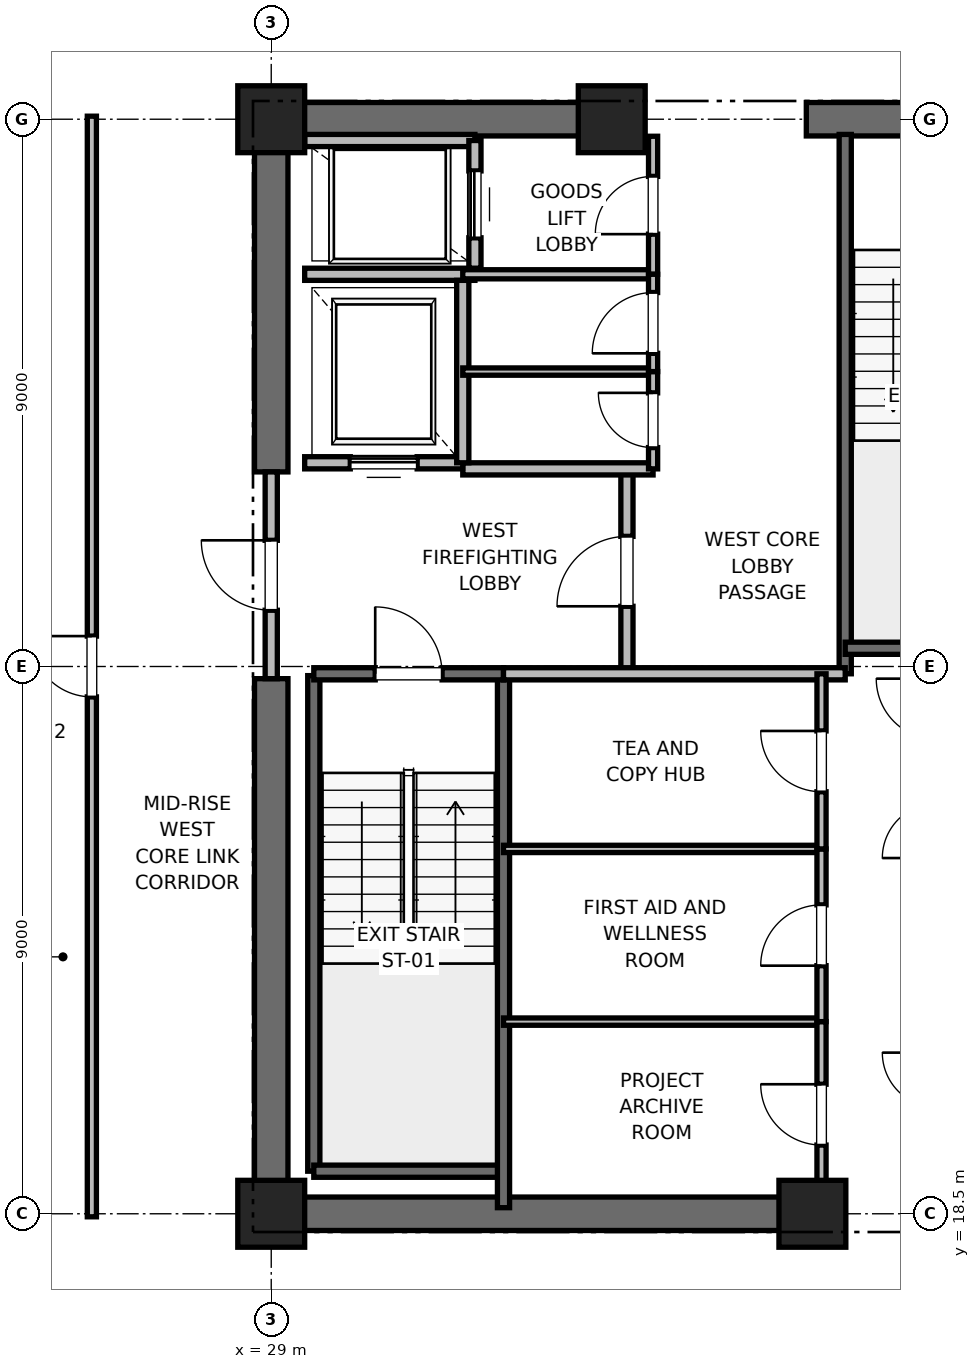
"""IFC4 building model, lengths in metres.
Left out: names, types, materials, properties, quantities, classifications, styles, units other than length and angle.
Written with IfcOpenShell. Run it as: python <this file> out.ifc"""

import sys

from ifc_helpers import new_model, si_unit, direction, frame, frame_2d, origin, origin_2d, place, context, subcontext, project, spatial, rectangle, extrude, element, fill, save


model = new_model("IFC4")
c1 = context("Model", 3, precision=1e-05, world=origin(), true_north=direction((0.0, 1.0)))
c2 = subcontext(c1, "Body", "Model", "MODEL_VIEW")
j1 = project(units=[si_unit("LENGTHUNIT", "METRE"), si_unit("PLANEANGLEUNIT", "RADIAN")], contexts=[c1])
p1 = place(None, origin())
s1 = spatial("IfcSite", under=j1, at=p1, CompositionType="ELEMENT")
p2 = place(p1, origin())
s2 = spatial("IfcBuilding", under=s1, at=p2, CompositionType="ELEMENT")
p3 = place(p2, frame((0.0, 0.0, 148.4)))
s3 = spatial("IfcBuildingStorey", under=s2, at=p3, CompositionType="ELEMENT", Elevation=148.4)
for number, where, z_axis, x_axis in (
    (1, (29.0, 18.5, 0.0), (0.0, 0.0, 1.0), (1.0, 0.0, 0.0)),
    (2, (29.0, 36.5, 0.0), (0.0, 0.0, 1.0), (1.0, 0.0, 0.0)),
    (3, (37.9, 18.5, 0.0), (0.0, 0.0, 1.0), (1.0, 0.0, 0.0)),
    (4, (34.6, 36.5, 0.0), (0.0, 0.0, 1.0), (1.0, 0.0, 0.0)),
):
    element("IfcColumn", number, at=place(p3, frame(where, z_axis=z_axis, x_axis=x_axis)), inside=s3, PredefinedType="PILASTER", context=c2, shape_type="SweptSolid", body=[
        extrude(rectangle(XDim=1.1, YDim=1.1, at=origin_2d()), origin(), (0.0, 0.0, 1.0), 4.0),
    ])
p4 = place(p3, frame((29.0, 18.5, 0.0), z_axis=(0.0, 0.0, 1.0), x_axis=(1.0, 0.0, 0.0)))
e5 = element("IfcWall", 5, at=p4, inside=s3, PredefinedType="SHEAR", context=c2, shape_type="SweptSolid", body=[
    extrude(rectangle(XDim=9.2, YDim=0.55, at=frame_2d((4.6, 0.0))), origin(), (0.0, 0.0, 1.0), 3.775),
])
p5 = place(p3, frame((29.0, 36.5, 0.0), z_axis=(0.0, 0.0, 1.0), x_axis=(1.0, 0.0, 0.0)))
e6 = element("IfcWall", 6, at=p5, inside=s3, PredefinedType="SHEAR", context=c2, shape_type="SweptSolid", body=[
    extrude(rectangle(XDim=5.8, YDim=0.55, at=frame_2d((2.9, 0.0))), origin(), (0.0, 0.0, 1.0), 3.775),
])
p6 = place(p3, frame((37.8, 36.5, 0.0), z_axis=(0.0, 0.0, 1.0), x_axis=(1.0, 0.0, 0.0)))
e7 = element("IfcWall", 7, at=p6, inside=s3, PredefinedType="SHEAR", context=c2, shape_type="SweptSolid", body=[
    extrude(rectangle(XDim=4.4, YDim=0.55, at=frame_2d((2.2, 0.0))), origin(), (0.0, 0.0, 1.0), 3.775),
])
p7 = place(p6, frame((1.65, 0.0, 0.0)))
e8 = element("IfcOpeningElement", 8, at=p7, cuts=e7, PredefinedType="OPENING", context=c2, shape_type="SweptSolid", body=[
    extrude(rectangle(XDim=1.1, YDim=2.15, at=frame_2d((0.55, 1.075))), frame((0.0, 0.275, 0.0), z_axis=(0.0, -1.0, 0.0), x_axis=(1.0, 0.0, 0.0)), (0.0, 0.0, 1.0), 0.55),
])
p8 = place(p3, frame((29.0, 18.5, 0.0), z_axis=(0.0, 0.0, 1.0), x_axis=(0.0, 1.0, 0.0)))
e9 = element("IfcWall", 9, at=p8, inside=s3, PredefinedType="SHEAR", context=c2, shape_type="SweptSolid", body=[
    extrude(rectangle(XDim=8.8, YDim=0.55, at=frame_2d((4.4, 0.0))), origin(), (0.0, 0.0, 1.0), 3.775),
])
p9 = place(p3, frame((29.0, 30.7, 0.0), z_axis=(0.0, 0.0, 1.0), x_axis=(0.0, 1.0, 0.0)))
e10 = element("IfcWall", 10, at=p9, inside=s3, PredefinedType="SHEAR", context=c2, shape_type="SweptSolid", body=[
    extrude(rectangle(XDim=5.8, YDim=0.55, at=frame_2d((2.9, 0.0))), origin(), (0.0, 0.0, 1.0), 3.775),
])
p10 = place(p3, frame((29.7, 19.2, 0.0), z_axis=(0.0, 0.0, 1.0), x_axis=(0.0, 1.0, 0.0)))
e11 = element("IfcWall", 11, at=p10, inside=s3, PredefinedType="SOLIDWALL", context=c2, shape_type="SweptSolid", body=[
    extrude(rectangle(XDim=8.15, YDim=0.2, at=frame_2d((4.075, 0.0))), origin(), (0.0, 0.0, 1.0), 3.775),
])
p11 = place(p3, frame((29.7, 19.2, 0.0), z_axis=(0.0, 0.0, 1.0), x_axis=(1.0, 0.0, 0.0)))
e12 = element("IfcWall", 12, at=p11, inside=s3, PredefinedType="SOLIDWALL", context=c2, shape_type="SweptSolid", body=[
    extrude(rectangle(XDim=3.12, YDim=0.2, at=frame_2d((1.56, 0.0))), origin(), (0.0, 0.0, 1.0), 3.775),
])
p12 = place(p3, frame((32.82, 18.6, 0.0), z_axis=(0.0, 0.0, 1.0), x_axis=(0.0, 1.0, 0.0)))
e13 = element("IfcWall", 13, at=p12, inside=s3, PredefinedType="SOLIDWALL", context=c2, shape_type="SweptSolid", body=[
    extrude(rectangle(XDim=8.78, YDim=0.2, at=frame_2d((4.39, 0.0))), origin(), (0.0, 0.0, 1.0), 3.775),
])
p13 = place(p3, frame((29.7, 27.38, 0.0), z_axis=(0.0, 0.0, 1.0), x_axis=(1.0, 0.0, 0.0)))
e14 = element("IfcWall", 14, at=p13, inside=s3, PredefinedType="SOLIDWALL", context=c2, shape_type="SweptSolid", body=[
    extrude(rectangle(XDim=3.12, YDim=0.2, at=frame_2d((1.56, 0.0))), origin(), (0.0, 0.0, 1.0), 3.775),
])
p14 = place(p13, frame((1.01, 0.0, 0.0)))
e15 = element("IfcOpeningElement", 15, at=p14, cuts=e14, PredefinedType="OPENING", context=c2, shape_type="SweptSolid", body=[
    extrude(rectangle(XDim=1.1, YDim=2.15, at=frame_2d((0.55, 1.075))), frame((0.0, 0.1, 0.0), z_axis=(0.0, -1.0, 0.0), x_axis=(1.0, 0.0, 0.0)), (0.0, 0.0, 1.0), 0.2),
])
p15 = place(p3, frame((38.44, 27.38, 0.0), z_axis=(0.0, 0.0, 1.0), x_axis=(0.0, 1.0, 0.0)))
e16 = element("IfcWall", 16, at=p15, inside=s3, PredefinedType="SOLIDWALL", context=c2, shape_type="SweptSolid", body=[
    extrude(rectangle(XDim=8.87, YDim=0.2, at=frame_2d((4.435, 0.0))), origin(), (0.0, 0.0, 1.0), 3.775),
])
p16 = place(p3, frame((38.44, 27.8, 0.0), z_axis=(0.0, 0.0, 1.0), x_axis=(1.0, 0.0, 0.0)))
e17 = element("IfcWall", 17, at=p16, inside=s3, PredefinedType="SOLIDWALL", context=c2, shape_type="SweptSolid", body=[
    extrude(rectangle(XDim=3.32, YDim=0.2, at=frame_2d((1.66, 0.0))), origin(), (0.0, 0.0, 1.0), 3.775),
])
p17 = place(p3, frame((34.85, 27.38, 0.0), z_axis=(0.0, 0.0, 1.0), x_axis=(0.0, 1.0, 0.0)))
e18 = element("IfcWall", 18, at=p17, inside=s3, PredefinedType="PARTITIONING", context=c2, shape_type="SweptSolid", body=[
    extrude(rectangle(XDim=3.37, YDim=0.2, at=frame_2d((1.685, 0.0))), origin(), (0.0, 0.0, 1.0), 3.775),
])
p18 = place(p17, frame((1.11, 0.0, 0.0)))
e19 = element("IfcOpeningElement", 19, at=p18, cuts=e18, PredefinedType="OPENING", context=c2, shape_type="SweptSolid", body=[
    extrude(rectangle(XDim=1.15, YDim=2.2, at=frame_2d((0.575, 1.1))), frame((0.0, 0.1, 0.0), z_axis=(0.0, -1.0, 0.0), x_axis=(1.0, 0.0, 0.0)), (0.0, 0.0, 1.0), 0.2),
])
p19 = place(p3, frame((29.0, 27.3, 0.0), z_axis=(0.0, 0.0, 1.0), x_axis=(0.0, 1.0, 0.0)))
e20 = element("IfcWall", 20, at=p19, inside=s3, PredefinedType="PARTITIONING", context=c2, shape_type="SweptSolid", body=[
    extrude(rectangle(XDim=3.4, YDim=0.2, at=frame_2d((1.7, 0.0))), origin(), (0.0, 0.0, 1.0), 2.755),
])
p20 = place(p19, frame((1.125, 0.0, 0.0)))
e21 = element("IfcOpeningElement", 21, at=p20, cuts=e20, PredefinedType="OPENING", context=c2, shape_type="SweptSolid", body=[
    extrude(rectangle(XDim=1.15, YDim=2.2, at=frame_2d((0.575, 1.1))), frame((0.0, 0.1, 0.0), z_axis=(0.0, -1.0, 0.0), x_axis=(1.0, 0.0, 0.0)), (0.0, 0.0, 1.0), 0.2),
])
p21 = place(p3, frame((32.82, 27.38, 0.0), z_axis=(0.0, 0.0, 1.0), x_axis=(1.0, 0.0, 0.0)))
e22 = element("IfcWall", 22, at=p21, inside=s3, PredefinedType="PARTITIONING", context=c2, shape_type="SweptSolid", body=[
    extrude(rectangle(XDim=5.62, YDim=0.2, at=frame_2d((2.81, 0.0))), origin(), (0.0, 0.0, 1.0), 3.775),
])
p22 = place(p3, frame((32.15, 30.75, 0.0), z_axis=(0.0, 0.0, 1.0), x_axis=(1.0, 0.0, 0.0)))
e23 = element("IfcWall", 23, at=p22, inside=s3, PredefinedType="PARTITIONING", context=c2, shape_type="SweptSolid", body=[
    extrude(rectangle(XDim=3.13, YDim=0.2, at=frame_2d((1.565, 0.0))), origin(), (0.0, 0.0, 1.0), 3.775),
])
p23 = place(p3, frame((29.55, 30.85, 0.0), z_axis=(0.0, 0.0, 1.0), x_axis=(1.0, 0.0, 0.0)))
e24 = element("IfcWall", 24, at=p23, inside=s3, PredefinedType="SOLIDWALL", context=c2, shape_type="SweptSolid", body=[
    extrude(rectangle(XDim=2.6, YDim=0.2, at=frame_2d((1.3, 0.0))), origin(), (0.0, 0.0, 1.0), 2.755),
])
p24 = place(p23, frame((0.75, 0.0, 0.0)))
e25 = element("IfcOpeningElement", 25, at=p24, cuts=e24, PredefinedType="OPENING", context=c2, shape_type="SweptSolid", body=[
    extrude(rectangle(XDim=1.1, YDim=2.2, at=frame_2d((0.55, 1.1))), frame((0.0, 0.1, 0.0), z_axis=(0.0, -1.0, 0.0), x_axis=(1.0, 0.0, 0.0)), (0.0, 0.0, 1.0), 0.2),
])
p25 = place(p3, frame((29.55, 33.95, 0.0), z_axis=(0.0, 0.0, 1.0), x_axis=(1.0, 0.0, 0.0)))
e26 = element("IfcWall", 26, at=p25, inside=s3, PredefinedType="SOLIDWALL", context=c2, shape_type="SweptSolid", body=[
    extrude(rectangle(XDim=2.8, YDim=0.2, at=frame_2d((1.4, 0.0))), origin(), (0.0, 0.0, 1.0), 3.775),
])
p26 = place(p3, frame((32.15, 30.85, 0.0), z_axis=(0.0, 0.0, 1.0), x_axis=(0.0, 1.0, 0.0)))
e27 = element("IfcWall", 27, at=p26, inside=s3, PredefinedType="SOLIDWALL", context=c2, shape_type="SweptSolid", body=[
    extrude(rectangle(XDim=3.0, YDim=0.2, at=frame_2d((1.5, 0.0))), origin(), (0.0, 0.0, 1.0), 3.775),
])
p27 = place(p3, frame((32.35, 36.15, 0.0), z_axis=(0.0, 0.0, 1.0), x_axis=(-1.0, 0.0, 0.0)))
e28 = element("IfcWall", 28, at=p27, inside=s3, PredefinedType="SOLIDWALL", context=c2, shape_type="SweptSolid", body=[
    extrude(rectangle(XDim=2.8, YDim=0.2, at=frame_2d((1.4, 0.0))), origin(), (0.0, 0.0, 1.0), 2.985),
])
p28 = place(p3, frame((32.35, 34.05, 0.0), z_axis=(0.0, 0.0, 1.0), x_axis=(0.0, 1.0, 0.0)))
e29 = element("IfcWall", 29, at=p28, inside=s3, PredefinedType="SOLIDWALL", context=c2, shape_type="SweptSolid", body=[
    extrude(rectangle(XDim=2.1, YDim=0.2, at=frame_2d((1.05, 0.0))), origin(), (0.0, 0.0, 1.0), 3.775),
])
p29 = place(p28, frame((0.5, 0.0, 0.0)))
e30 = element("IfcOpeningElement", 30, at=p29, cuts=e29, PredefinedType="OPENING", context=c2, shape_type="SweptSolid", body=[
    extrude(rectangle(XDim=1.1, YDim=2.2, at=frame_2d((0.55, 1.1))), frame((0.0, 0.1, 0.0), z_axis=(0.0, -1.0, 0.0), x_axis=(1.0, 0.0, 0.0)), (0.0, 0.0, 1.0), 0.2),
])
p30 = place(p3, frame((32.15, 33.95, 0.0), z_axis=(0.0, 0.0, 1.0), x_axis=(1.0, 0.0, 0.0)))
e31 = element("IfcWall", 31, at=p30, inside=s3, PredefinedType="PARTITIONING", context=c2, shape_type="SweptSolid", body=[
    extrude(rectangle(XDim=3.13, YDim=0.15, at=frame_2d((1.565, 0.0))), origin(), (0.0, 0.0, 1.0), 2.85),
])
p31 = place(p3, frame((35.28, 33.95, 0.0), z_axis=(0.0, 0.0, 1.0), x_axis=(0.0, 1.0, 0.0)))
e32 = element("IfcWall", 32, at=p31, inside=s3, PredefinedType="PARTITIONING", context=c2, shape_type="SweptSolid", body=[
    extrude(rectangle(XDim=2.27, YDim=0.15, at=frame_2d((1.135, 0.0))), origin(), (0.0, 0.0, 1.0), 2.755),
])
p32 = place(p31, frame((0.66, 0.0, 0.0)))
e33 = element("IfcOpeningElement", 33, at=p32, cuts=e32, PredefinedType="OPENING", context=c2, shape_type="SweptSolid", body=[
    extrude(rectangle(XDim=0.95, YDim=2.15, at=frame_2d((0.475, 1.075))), frame((0.0, 0.075, 0.0), z_axis=(0.0, -1.0, 0.0), x_axis=(1.0, 0.0, 0.0)), (0.0, 0.0, 1.0), 0.15),
])
p33 = place(p3, frame((32.15, 32.35, 0.0), z_axis=(0.0, 0.0, 1.0), x_axis=(1.0, 0.0, 0.0)))
e34 = element("IfcWall", 34, at=p33, inside=s3, PredefinedType="PARTITIONING", context=c2, shape_type="SweptSolid", body=[
    extrude(rectangle(XDim=3.13, YDim=0.12, at=frame_2d((1.565, 0.0))), origin(), (0.0, 0.0, 1.0), 2.85),
])
p34 = place(p3, frame((35.28, 30.75, 0.0), z_axis=(0.0, 0.0, 1.0), x_axis=(0.0, 1.0, 0.0)))
e35 = element("IfcWall", 35, at=p34, inside=s3, PredefinedType="PARTITIONING", context=c2, shape_type="SweptSolid", body=[
    extrude(rectangle(XDim=1.6, YDim=0.15, at=frame_2d((0.8, 0.0))), origin(), (0.0, 0.0, 1.0), 2.85),
])
p35 = place(p34, frame((0.35, 0.0, 0.0)))
e36 = element("IfcOpeningElement", 36, at=p35, cuts=e35, PredefinedType="OPENING", context=c2, shape_type="SweptSolid", body=[
    extrude(rectangle(XDim=0.9, YDim=2.1, at=frame_2d((0.45, 1.05))), frame((0.0, 0.075, 0.0), z_axis=(0.0, -1.0, 0.0), x_axis=(1.0, 0.0, 0.0)), (0.0, 0.0, 1.0), 0.15),
])
p36 = place(p3, frame((35.28, 32.35, 0.0), z_axis=(0.0, 0.0, 1.0), x_axis=(0.0, 1.0, 0.0)))
e37 = element("IfcWall", 37, at=p36, inside=s3, PredefinedType="PARTITIONING", context=c2, shape_type="SweptSolid", body=[
    extrude(rectangle(XDim=1.6, YDim=0.15, at=frame_2d((0.8, 0.0))), origin(), (0.0, 0.0, 1.0), 2.85),
])
p37 = place(p36, frame((0.3, 0.0, 0.0)))
e38 = element("IfcOpeningElement", 38, at=p37, cuts=e37, PredefinedType="OPENING", context=c2, shape_type="SweptSolid", body=[
    extrude(rectangle(XDim=1.0, YDim=2.15, at=frame_2d((0.5, 1.075))), frame((0.0, 0.075, 0.0), z_axis=(0.0, -1.0, 0.0), x_axis=(1.0, 0.0, 0.0)), (0.0, 0.0, 1.0), 0.15),
])
for number, where, z_axis, x_axis in (
    (39, (32.82, 21.66, 0.0), (0.0, 0.0, 1.0), (1.0, 0.0, 0.0)),
    (40, (32.82, 24.5, 0.0), (0.0, 0.0, 1.0), (1.0, 0.0, 0.0)),
):
    element("IfcWall", number, at=place(p3, frame(where, z_axis=z_axis, x_axis=x_axis)), inside=s3, PredefinedType="PARTITIONING", context=c2, shape_type="SweptSolid", body=[
        extrude(rectangle(XDim=5.23, YDim=0.12, at=frame_2d((2.615, 0.0))), origin(), (0.0, 0.0, 1.0), 2.85),
    ])
p38 = place(p3, frame((38.05, 18.6, 0.0), z_axis=(0.0, 0.0, 1.0), x_axis=(0.0, 1.0, 0.0)))
e41 = element("IfcWall", 41, at=p38, inside=s3, PredefinedType="PARTITIONING", context=c2, shape_type="SweptSolid", body=[
    extrude(rectangle(XDim=3.06, YDim=0.15, at=frame_2d((1.53, 0.0))), origin(), (0.0, 0.0, 1.0), 2.755),
])
p39 = place(p38, frame((1.03, 0.0, 0.0)))
e42 = element("IfcOpeningElement", 42, at=p39, cuts=e41, PredefinedType="OPENING", context=c2, shape_type="SweptSolid", body=[
    extrude(rectangle(XDim=1.0, YDim=2.15, at=frame_2d((0.5, 1.075))), frame((0.0, 0.075, 0.0), z_axis=(0.0, -1.0, 0.0), x_axis=(1.0, 0.0, 0.0)), (0.0, 0.0, 1.0), 0.15),
])
p40 = place(p3, frame((38.05, 21.66, 0.0), z_axis=(0.0, 0.0, 1.0), x_axis=(0.0, 1.0, 0.0)))
e43 = element("IfcWall", 43, at=p40, inside=s3, PredefinedType="PARTITIONING", context=c2, shape_type="SweptSolid", body=[
    extrude(rectangle(XDim=2.84, YDim=0.15, at=frame_2d((1.42, 0.0))), origin(), (0.0, 0.0, 1.0), 2.85),
])
p41 = place(p40, frame((0.92, 0.0, 0.0)))
e44 = element("IfcOpeningElement", 44, at=p41, cuts=e43, PredefinedType="OPENING", context=c2, shape_type="SweptSolid", body=[
    extrude(rectangle(XDim=1.0, YDim=2.15, at=frame_2d((0.5, 1.075))), frame((0.0, 0.075, 0.0), z_axis=(0.0, -1.0, 0.0), x_axis=(1.0, 0.0, 0.0)), (0.0, 0.0, 1.0), 0.15),
])
p42 = place(p3, frame((38.05, 24.5, 0.0), z_axis=(0.0, 0.0, 1.0), x_axis=(0.0, 1.0, 0.0)))
e45 = element("IfcWall", 45, at=p42, inside=s3, PredefinedType="PARTITIONING", context=c2, shape_type="SweptSolid", body=[
    extrude(rectangle(XDim=2.88, YDim=0.15, at=frame_2d((1.44, 0.0))), origin(), (0.0, 0.0, 1.0), 2.85),
])
p43 = place(p42, frame((0.94, 0.0, 0.0)))
e46 = element("IfcOpeningElement", 46, at=p43, cuts=e45, PredefinedType="OPENING", context=c2, shape_type="SweptSolid", body=[
    extrude(rectangle(XDim=1.0, YDim=2.15, at=frame_2d((0.5, 1.075))), frame((0.0, 0.075, 0.0), z_axis=(0.0, -1.0, 0.0), x_axis=(1.0, 0.0, 0.0)), (0.0, 0.0, 1.0), 0.15),
])
p44 = place(p3, frame((26.05, 18.45, 0.0), z_axis=(0.0, 0.0, 1.0), x_axis=(0.0, 1.0, 0.0)))
e47 = element("IfcWall", 47, at=p44, inside=s3, PredefinedType="PARTITIONING", context=c2, shape_type="SweptSolid", body=[
    extrude(rectangle(XDim=18.1, YDim=0.15, at=frame_2d((9.05, 0.0))), origin(), (0.0, 0.0, 1.0), 2.85),
])
p45 = place(p44, frame((8.55, 0.0, 0.0)))
e48 = element("IfcOpeningElement", 48, at=p45, cuts=e47, PredefinedType="OPENING", context=c2, shape_type="SweptSolid", body=[
    extrude(rectangle(XDim=1.0, YDim=2.15, at=frame_2d((0.5, 1.075))), frame((0.0, 0.075, 0.0), z_axis=(0.0, -1.0, 0.0), x_axis=(1.0, 0.0, 0.0)), (0.0, 0.0, 1.0), 0.15),
])
p46 = place(p14, origin())
e49 = element("IfcDoor", 49, at=p46, inside=s3, OperationType="SINGLE_SWING_LEFT", PredefinedType="DOOR", context=c2, shape_type="SweptSolid", body=[
    extrude(rectangle(XDim=1.1, YDim=2.15, at=frame_2d((0.55, 1.075))), frame((0.0, 0.025, 0.0), z_axis=(0.0, -1.0, 0.0), x_axis=(1.0, 0.0, 0.0)), (0.0, 0.0, 1.0), 0.05),
])
fill(e15, e49)
p47 = place(p18, origin())
e50 = element("IfcDoor", 50, at=p47, inside=s3, OperationType="SINGLE_SWING_LEFT", PredefinedType="DOOR", context=c2, shape_type="SweptSolid", body=[
    extrude(rectangle(XDim=1.15, YDim=2.2, at=frame_2d((0.575, 1.1))), frame((0.0, 0.025, 0.0), z_axis=(0.0, -1.0, 0.0), x_axis=(1.0, 0.0, 0.0)), (0.0, 0.0, 1.0), 0.05),
])
fill(e19, e50)
p48 = place(p20, origin())
e51 = element("IfcDoor", 51, at=p48, inside=s3, OperationType="SINGLE_SWING_RIGHT", PredefinedType="DOOR", context=c2, shape_type="SweptSolid", body=[
    extrude(rectangle(XDim=1.15, YDim=2.2, at=frame_2d((0.575, 1.1))), frame((0.0, 0.025, 0.0), z_axis=(0.0, -1.0, 0.0), x_axis=(1.0, 0.0, 0.0)), (0.0, 0.0, 1.0), 0.05),
])
fill(e21, e51)
p49 = place(p24, origin())
e52 = element("IfcDoor", 52, at=p49, inside=s3, OperationType="SLIDING_TO_RIGHT", PredefinedType="DOOR", context=c2, shape_type="SweptSolid", body=[
    extrude(rectangle(XDim=1.1, YDim=2.2, at=frame_2d((0.55, 1.1))), frame((0.0, 0.025, 0.0), z_axis=(0.0, -1.0, 0.0), x_axis=(1.0, 0.0, 0.0)), (0.0, 0.0, 1.0), 0.05),
])
fill(e25, e52)
p50 = place(p29, origin())
e53 = element("IfcDoor", 53, at=p50, inside=s3, OperationType="SLIDING_TO_RIGHT", PredefinedType="DOOR", context=c2, shape_type="SweptSolid", body=[
    extrude(rectangle(XDim=1.1, YDim=2.2, at=frame_2d((0.55, 1.1))), frame((0.0, 0.025, 0.0), z_axis=(0.0, -1.0, 0.0), x_axis=(1.0, 0.0, 0.0)), (0.0, 0.0, 1.0), 0.05),
])
fill(e30, e53)
p51 = place(p32, origin())
e54 = element("IfcDoor", 54, at=p51, inside=s3, OperationType="SINGLE_SWING_LEFT", PredefinedType="DOOR", context=c2, shape_type="SweptSolid", body=[
    extrude(rectangle(XDim=0.95, YDim=2.15, at=frame_2d((0.475, 1.075))), frame((0.0, 0.025, 0.0), z_axis=(0.0, -1.0, 0.0), x_axis=(1.0, 0.0, 0.0)), (0.0, 0.0, 1.0), 0.05),
])
fill(e33, e54)
p52 = place(p35, origin())
e55 = element("IfcDoor", 55, at=p52, inside=s3, OperationType="SINGLE_SWING_RIGHT", PredefinedType="DOOR", context=c2, shape_type="SweptSolid", body=[
    extrude(rectangle(XDim=0.9, YDim=2.1, at=frame_2d((0.45, 1.05))), frame((0.0, 0.025, 0.0), z_axis=(0.0, -1.0, 0.0), x_axis=(1.0, 0.0, 0.0)), (0.0, 0.0, 1.0), 0.05),
])
fill(e36, e55)
p53 = place(p37, origin())
e56 = element("IfcDoor", 56, at=p53, inside=s3, OperationType="SINGLE_SWING_LEFT", PredefinedType="DOOR", context=c2, shape_type="SweptSolid", body=[
    extrude(rectangle(XDim=1.0, YDim=2.15, at=frame_2d((0.5, 1.075))), frame((0.0, 0.025, 0.0), z_axis=(0.0, -1.0, 0.0), x_axis=(1.0, 0.0, 0.0)), (0.0, 0.0, 1.0), 0.05),
])
fill(e38, e56)
p54 = place(p39, origin())
e57 = element("IfcDoor", 57, at=p54, inside=s3, OperationType="SINGLE_SWING_RIGHT", PredefinedType="DOOR", context=c2, shape_type="SweptSolid", body=[
    extrude(rectangle(XDim=1.0, YDim=2.15, at=frame_2d((0.5, 1.075))), frame((0.0, 0.025, 0.0), z_axis=(0.0, -1.0, 0.0), x_axis=(1.0, 0.0, 0.0)), (0.0, 0.0, 1.0), 0.05),
])
fill(e42, e57)
p55 = place(p41, origin())
e58 = element("IfcDoor", 58, at=p55, inside=s3, OperationType="SINGLE_SWING_LEFT", PredefinedType="DOOR", context=c2, shape_type="SweptSolid", body=[
    extrude(rectangle(XDim=1.0, YDim=2.15, at=frame_2d((0.5, 1.075))), frame((0.0, 0.025, 0.0), z_axis=(0.0, -1.0, 0.0), x_axis=(1.0, 0.0, 0.0)), (0.0, 0.0, 1.0), 0.05),
])
fill(e44, e58)
p56 = place(p43, origin())
e59 = element("IfcDoor", 59, at=p56, inside=s3, OperationType="SINGLE_SWING_RIGHT", PredefinedType="DOOR", context=c2, shape_type="SweptSolid", body=[
    extrude(rectangle(XDim=1.0, YDim=2.15, at=frame_2d((0.5, 1.075))), frame((0.0, 0.025, 0.0), z_axis=(0.0, -1.0, 0.0), x_axis=(1.0, 0.0, 0.0)), (0.0, 0.0, 1.0), 0.05),
])
fill(e46, e59)
p57 = place(p45, origin())
e60 = element("IfcDoor", 60, at=p57, inside=s3, OperationType="SINGLE_SWING_RIGHT", PredefinedType="DOOR", context=c2, shape_type="SweptSolid", body=[
    extrude(rectangle(XDim=1.0, YDim=2.15, at=frame_2d((0.5, 1.075))), frame((0.0, 0.025, 0.0), z_axis=(0.0, -1.0, 0.0), x_axis=(1.0, 0.0, 0.0)), (0.0, 0.0, 1.0), 0.05),
])
fill(e48, e60)
save(model, sys.argv[1])
